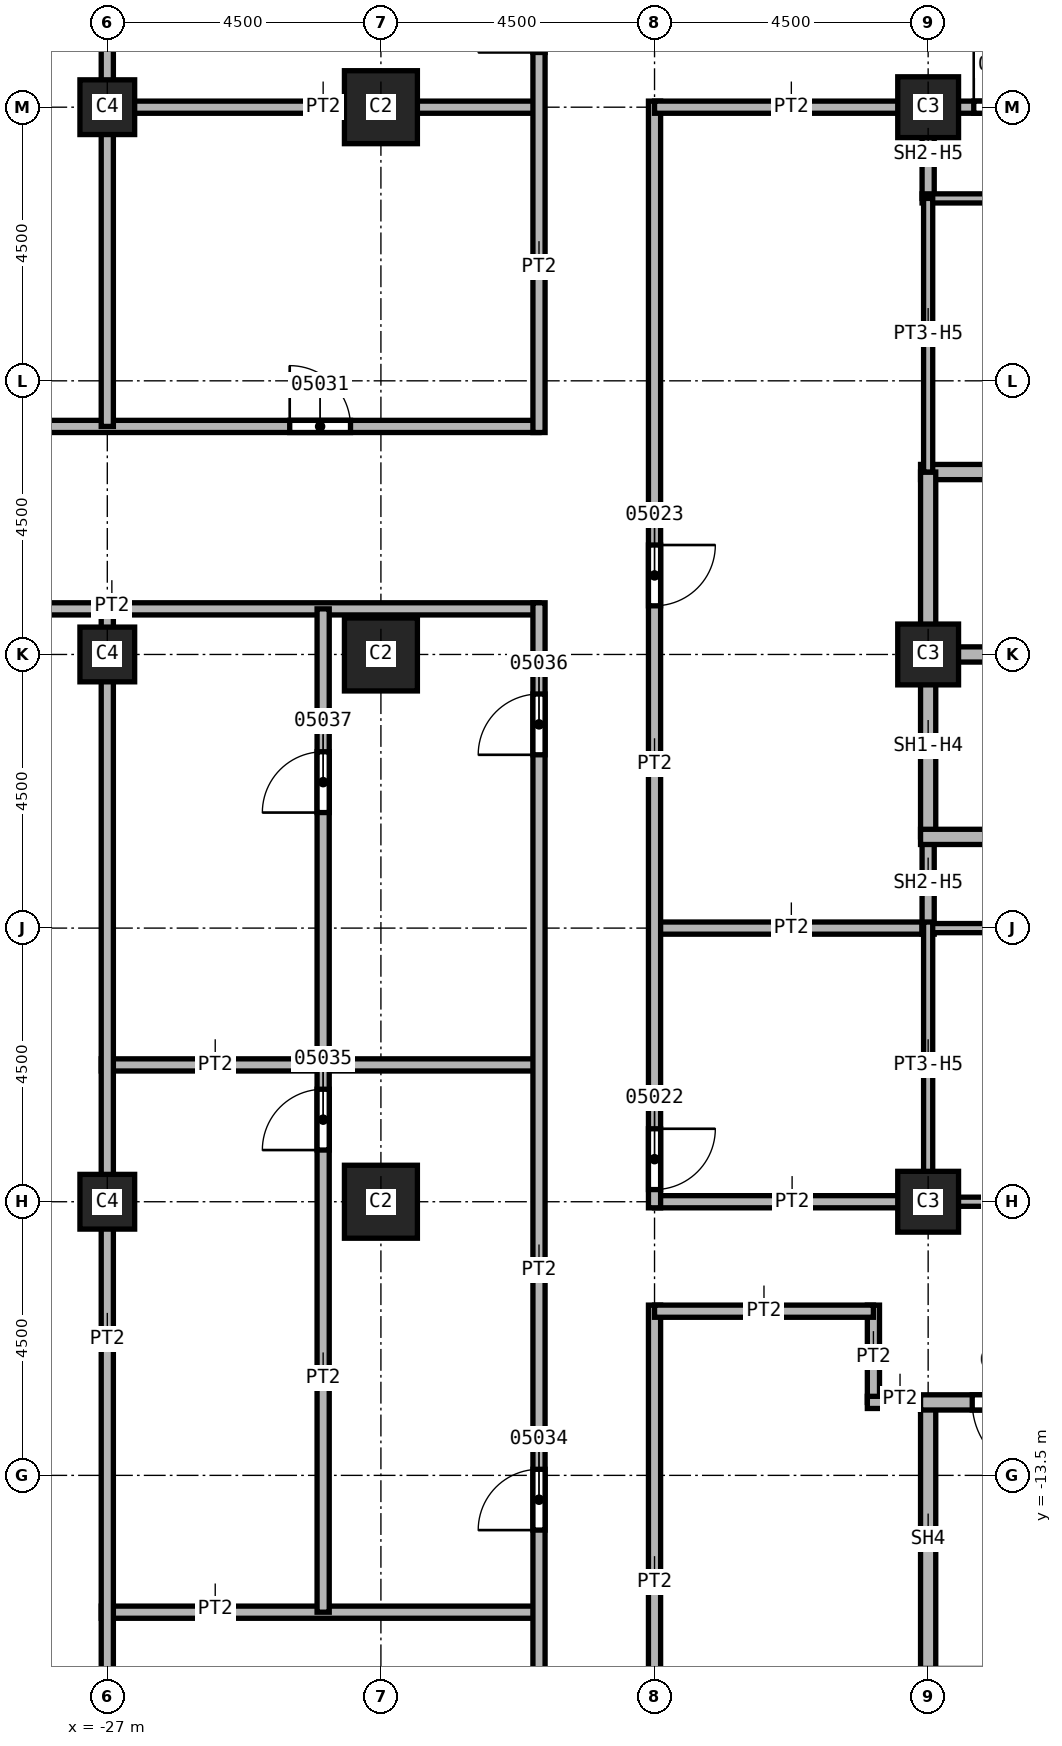
"""IFC4 building model, lengths in metres.
Left out: names, types, materials, properties, quantities, classifications, styles, units other than length and angle.
Written with IfcOpenShell. Run it as: python <this file> out.ifc"""

import sys

from ifc_helpers import new_model, si_unit, direction, frame, frame_2d, origin, origin_2d, place, context, subcontext, project, spatial, rectangle, extrude, element, fill, save


model = new_model("IFC4")
c1 = context("Model", 3, precision=1e-05, world=origin(), true_north=direction((0.0, 1.0)))
c2 = subcontext(c1, "Body", "Model", "MODEL_VIEW")
j1 = project(units=[si_unit("LENGTHUNIT", "METRE"), si_unit("PLANEANGLEUNIT", "RADIAN")], contexts=[c1])
p1 = place(None, origin())
s1 = spatial("IfcSite", under=j1, at=p1, CompositionType="ELEMENT")
p2 = place(p1, origin())
s2 = spatial("IfcBuilding", under=s1, at=p2, CompositionType="ELEMENT")
p3 = place(p2, frame((0.0, 0.0, 112.0)))
s3 = spatial("IfcBuildingStorey", under=s2, at=p3, CompositionType="ELEMENT", Elevation=112.0)
for number, where, z_axis, x_axis in (
    (1, (-22.5, 0.0, 0.0), (0.0, 0.0, 1.0), (1.0, 0.0, 0.0)),
    (2, (-22.5, 9.0, 0.0), (0.0, 0.0, 1.0), (1.0, 0.0, 0.0)),
    (3, (-22.5, -9.0, 0.0), (0.0, 0.0, 1.0), (1.0, 0.0, 0.0)),
):
    element("IfcColumn", number, at=place(p3, frame(where, z_axis=z_axis, x_axis=x_axis)), inside=s3, PredefinedType="COLUMN", context=c2, shape_type="SweptSolid", body=[
        extrude(rectangle(XDim=1.2, YDim=1.2, at=origin_2d()), origin(), (0.0, 0.0, 1.0), 3.7),
    ])
for number, where, z_axis, x_axis in (
    (4, (-13.5, 0.0, 0.0), (0.0, 0.0, 1.0), (1.0, 0.0, 0.0)),
    (5, (-13.5, 9.0, 0.0), (0.0, 0.0, 1.0), (1.0, 0.0, 0.0)),
    (6, (-13.5, -9.0, 0.0), (0.0, 0.0, 1.0), (1.0, 0.0, 0.0)),
):
    element("IfcColumn", number, at=place(p3, frame(where, z_axis=z_axis, x_axis=x_axis)), inside=s3, PredefinedType="COLUMN", context=c2, shape_type="SweptSolid", body=[
        extrude(rectangle(XDim=1.0, YDim=1.0, at=origin_2d()), origin(), (0.0, 0.0, 1.0), 3.7),
    ])
for number, where, z_axis, x_axis in (
    (7, (-27.0, 0.0, 0.0), (0.0, 0.0, 1.0), (1.0, 0.0, 0.0)),
    (8, (-27.0, 9.0, 0.0), (0.0, 0.0, 1.0), (1.0, 0.0, 0.0)),
    (9, (-27.0, -9.0, 0.0), (0.0, 0.0, 1.0), (1.0, 0.0, 0.0)),
):
    element("IfcColumn", number, at=place(p3, frame(where, z_axis=z_axis, x_axis=x_axis)), inside=s3, PredefinedType="COLUMN", context=c2, shape_type="SweptSolid", body=[
        extrude(rectangle(XDim=0.9, YDim=0.9, at=origin_2d()), origin(), (0.0, 0.0, 1.0), 3.7),
    ])
p4 = place(p3, frame((-33.85, 3.75, 0.0), z_axis=(0.0, 0.0, 1.0), x_axis=(1.0, 0.0, 0.0)))
e10 = element("IfcWall", 10, at=p4, inside=s3, PredefinedType="PARTITIONING", context=c2, shape_type="SweptSolid", body=[
    extrude(rectangle(XDim=13.95, YDim=0.2, at=frame_2d((6.975, 0.0))), origin(), (0.0, 0.0, 1.0), 3.7),
])
p5 = place(p4, frame((9.85, 0.0, 0.0)))
e11 = element("IfcOpeningElement", 11, at=p5, cuts=e10, PredefinedType="OPENING", context=c2, shape_type="SweptSolid", body=[
    extrude(rectangle(XDim=1.0, YDim=2.1, at=frame_2d((0.5, 1.05))), frame((0.0, 0.1, 0.0), z_axis=(0.0, -1.0, 0.0), x_axis=(1.0, 0.0, 0.0)), (0.0, 0.0, 1.0), 0.2),
])
for number, where, z_axis, x_axis in (
    (12, (-27.1, -15.75, 0.0), (0.0, 0.0, 1.0), (1.0, 0.0, 0.0)),
    (13, (-27.1, -6.75, 0.0), (0.0, 0.0, 1.0), (1.0, 0.0, 0.0)),
    (14, (-27.1, 9.0, 0.0), (0.0, 0.0, 1.0), (1.0, 0.0, 0.0)),
):
    element("IfcWall", number, at=place(p3, frame(where, z_axis=z_axis, x_axis=x_axis)), inside=s3, PredefinedType="PARTITIONING", context=c2, shape_type="SweptSolid", body=[
        extrude(rectangle(XDim=7.2, YDim=0.2, at=frame_2d((3.6, 0.0))), origin(), (0.0, 0.0, 1.0), 3.7),
    ])
p6 = place(p3, frame((-27.0, -17.4, 0.0), z_axis=(0.0, 0.0, 1.0), x_axis=(0.0, 1.0, 0.0)))
e15 = element("IfcWall", 15, at=p6, inside=s3, PredefinedType="PARTITIONING", context=c2, shape_type="SweptSolid", body=[
    extrude(rectangle(XDim=18.15, YDim=0.2, at=frame_2d((9.075, 0.0))), origin(), (0.0, 0.0, 1.0), 3.7),
])
p7 = place(p3, frame((-27.0, 3.75, 0.0), z_axis=(0.0, 0.0, 1.0), x_axis=(0.0, 1.0, 0.0)))
e16 = element("IfcWall", 16, at=p7, inside=s3, PredefinedType="PARTITIONING", context=c2, shape_type="SweptSolid", body=[
    extrude(rectangle(XDim=13.65, YDim=0.2, at=frame_2d((6.825, 0.0))), origin(), (0.0, 0.0, 1.0), 3.7),
])
p8 = place(p3, frame((-19.9, 0.75, 0.0), z_axis=(0.0, 0.0, 1.0), x_axis=(-1.0, 0.0, 0.0)))
e17 = element("IfcWall", 17, at=p8, inside=s3, PredefinedType="PARTITIONING", context=c2, shape_type="SweptSolid", body=[
    extrude(rectangle(XDim=13.95, YDim=0.2, at=frame_2d((6.975, 0.0))), origin(), (0.0, 0.0, 1.0), 3.7),
])
p9 = place(p3, frame((-23.45, -15.75, 0.0), z_axis=(0.0, 0.0, 1.0), x_axis=(0.0, 1.0, 0.0)))
e18 = element("IfcWall", 18, at=p9, inside=s3, PredefinedType="PARTITIONING", context=c2, shape_type="SweptSolid", body=[
    extrude(rectangle(XDim=16.5, YDim=0.2, at=frame_2d((8.25, 0.0))), origin(), (0.0, 0.0, 1.0), 3.7),
])
p10 = place(p9, frame((7.6, 0.0, 0.0)))
e19 = element("IfcOpeningElement", 19, at=p10, cuts=e18, PredefinedType="OPENING", context=c2, shape_type="SweptSolid", body=[
    extrude(rectangle(XDim=1.0, YDim=2.1, at=frame_2d((0.5, 1.05))), frame((0.0, 0.1, 0.0), z_axis=(0.0, -1.0, 0.0), x_axis=(1.0, 0.0, 0.0)), (0.0, 0.0, 1.0), 0.2),
])
p11 = place(p9, frame((13.15, 0.0, 0.0)))
e20 = element("IfcOpeningElement", 20, at=p11, cuts=e18, PredefinedType="OPENING", context=c2, shape_type="SweptSolid", body=[
    extrude(rectangle(XDim=1.0, YDim=2.1, at=frame_2d((0.5, 1.05))), frame((0.0, 0.1, 0.0), z_axis=(0.0, -1.0, 0.0), x_axis=(1.0, 0.0, 0.0)), (0.0, 0.0, 1.0), 0.2),
])
p12 = place(p3, frame((-19.9, -24.5, 0.0), z_axis=(0.0, 0.0, 1.0), x_axis=(0.0, 1.0, 0.0)))
e21 = element("IfcWall", 21, at=p12, inside=s3, PredefinedType="PARTITIONING", context=c2, shape_type="SweptSolid", body=[
    extrude(rectangle(XDim=25.35, YDim=0.2, at=frame_2d((12.675, 0.0))), origin(), (0.0, 0.0, 1.0), 3.7),
])
p13 = place(p12, frame((2.05, 0.0, 0.0)))
e22 = element("IfcOpeningElement", 22, at=p13, cuts=e21, PredefinedType="OPENING", context=c2, shape_type="SweptSolid", body=[
    extrude(rectangle(XDim=1.0, YDim=2.1, at=frame_2d((0.5, 1.05))), frame((0.0, 0.1, 0.0), z_axis=(0.0, -1.0, 0.0), x_axis=(1.0, 0.0, 0.0)), (0.0, 0.0, 1.0), 0.2),
])
p14 = place(p12, frame((10.1, 0.0, 0.0)))
e23 = element("IfcOpeningElement", 23, at=p14, cuts=e21, PredefinedType="OPENING", context=c2, shape_type="SweptSolid", body=[
    extrude(rectangle(XDim=1.0, YDim=2.1, at=frame_2d((0.5, 1.05))), frame((0.0, 0.1, 0.0), z_axis=(0.0, -1.0, 0.0), x_axis=(1.0, 0.0, 0.0)), (0.0, 0.0, 1.0), 0.2),
])
p15 = place(p12, frame((22.85, 0.0, 0.0)))
e24 = element("IfcOpeningElement", 24, at=p15, cuts=e21, PredefinedType="OPENING", context=c2, shape_type="SweptSolid", body=[
    extrude(rectangle(XDim=1.0, YDim=2.1, at=frame_2d((0.5, 1.05))), frame((0.0, 0.1, 0.0), z_axis=(0.0, -1.0, 0.0), x_axis=(1.0, 0.0, 0.0)), (0.0, 0.0, 1.0), 0.2),
])
p16 = place(p3, frame((-19.9, 3.65, 0.0), z_axis=(0.0, 0.0, 1.0), x_axis=(0.0, 1.0, 0.0)))
e25 = element("IfcWall", 25, at=p16, inside=s3, PredefinedType="PARTITIONING", context=c2, shape_type="SweptSolid", body=[
    extrude(rectangle(XDim=9.95, YDim=0.2, at=frame_2d((4.975, 0.0))), origin(), (0.0, 0.0, 1.0), 3.7),
])
p17 = place(p16, frame((6.25, 0.0, 0.0)))
e26 = element("IfcOpeningElement", 26, at=p17, cuts=e25, PredefinedType="OPENING", context=c2, shape_type="SweptSolid", body=[
    extrude(rectangle(XDim=1.0, YDim=2.1, at=frame_2d((0.5, 1.05))), frame((0.0, 0.1, 0.0), z_axis=(0.0, -1.0, 0.0), x_axis=(1.0, 0.0, 0.0)), (0.0, 0.0, 1.0), 0.2),
])
p18 = place(p3, frame((-18.0, -10.7, 0.0), z_axis=(0.0, 0.0, 1.0), x_axis=(0.0, -1.0, 0.0)))
e27 = element("IfcWall", 27, at=p18, inside=s3, PredefinedType="PARTITIONING", context=c2, shape_type="SweptSolid", body=[
    extrude(rectangle(XDim=13.5, YDim=0.2, at=frame_2d((6.75, 0.0))), origin(), (0.0, 0.0, 1.0), 3.7),
])
p19 = place(p18, frame((8.9, 0.0, 0.0)))
e28 = element("IfcOpeningElement", 28, at=p19, cuts=e27, PredefinedType="OPENING", context=c2, shape_type="SweptSolid", body=[
    extrude(rectangle(XDim=1.0, YDim=2.1, at=frame_2d((0.5, 1.05))), frame((0.0, 0.1, 0.0), z_axis=(0.0, -1.0, 0.0), x_axis=(1.0, 0.0, 0.0)), (0.0, 0.0, 1.0), 0.2),
])
for number, where, z_axis, x_axis in (
    (29, (-18.0, -9.0, 0.0), (0.0, 0.0, 1.0), (1.0, 0.0, 0.0)),
    (30, (-18.0, -4.5, 0.0), (0.0, 0.0, 1.0), (1.0, 0.0, 0.0)),
):
    element("IfcWall", number, at=place(p3, frame(where, z_axis=z_axis, x_axis=x_axis)), inside=s3, PredefinedType="PARTITIONING", context=c2, shape_type="SweptSolid", body=[
        extrude(rectangle(XDim=4.5, YDim=0.2, at=frame_2d((2.25, 0.0))), origin(), (0.0, 0.0, 1.0), 3.7),
    ])
p20 = place(p3, frame((-18.0, 9.1, 0.0), z_axis=(0.0, 0.0, 1.0), x_axis=(0.0, -1.0, 0.0)))
e31 = element("IfcWall", 31, at=p20, inside=s3, PredefinedType="PARTITIONING", context=c2, shape_type="SweptSolid", body=[
    extrude(rectangle(XDim=18.2, YDim=0.2, at=frame_2d((9.1, 0.0))), origin(), (0.0, 0.0, 1.0), 3.7),
])
p21 = place(p20, frame((16.9, 0.0, 0.0)))
e32 = element("IfcOpeningElement", 32, at=p21, cuts=e31, PredefinedType="OPENING", context=c2, shape_type="SweptSolid", body=[
    extrude(rectangle(XDim=1.0, YDim=2.1, at=frame_2d((0.5, 1.05))), frame((0.0, 0.1, 0.0), z_axis=(0.0, -1.0, 0.0), x_axis=(1.0, 0.0, 0.0)), (0.0, 0.0, 1.0), 0.2),
])
p22 = place(p20, frame((7.3, 0.0, 0.0)))
e33 = element("IfcOpeningElement", 33, at=p22, cuts=e31, PredefinedType="OPENING", context=c2, shape_type="SweptSolid", body=[
    extrude(rectangle(XDim=1.0, YDim=2.1, at=frame_2d((0.5, 1.05))), frame((0.0, 0.1, 0.0), z_axis=(0.0, -1.0, 0.0), x_axis=(1.0, 0.0, 0.0)), (0.0, 0.0, 1.0), 0.2),
])
p23 = place(p3, frame((-14.4, -12.3, 0.0), z_axis=(0.0, 0.0, 1.0), x_axis=(0.0, 1.0, 0.0)))
e34 = element("IfcWall", 34, at=p23, inside=s3, PredefinedType="PARTITIONING", context=c2, shape_type="SweptSolid", body=[
    extrude(rectangle(XDim=1.6, YDim=0.2, at=frame_2d((0.8, 0.0))), origin(), (0.0, 0.0, 1.0), 3.7),
])
p24 = place(p3, frame((-14.4, -10.8, 0.0), z_axis=(0.0, 0.0, 1.0), x_axis=(-1.0, 0.0, 0.0)))
e35 = element("IfcWall", 35, at=p24, inside=s3, PredefinedType="PARTITIONING", context=c2, shape_type="SweptSolid", body=[
    extrude(rectangle(XDim=3.6, YDim=0.2, at=frame_2d((1.8, 0.0))), origin(), (0.0, 0.0, 1.0), 3.7),
])
p25 = place(p3, frame((-13.5, 9.0, 0.0), z_axis=(0.0, 0.0, 1.0), x_axis=(-1.0, 0.0, 0.0)))
e36 = element("IfcWall", 36, at=p25, inside=s3, PredefinedType="PARTITIONING", context=c2, shape_type="SweptSolid", body=[
    extrude(rectangle(XDim=4.5, YDim=0.2, at=frame_2d((2.25, 0.0))), origin(), (0.0, 0.0, 1.0), 3.7),
])
p26 = place(p3, frame((-13.375, -12.3, 0.0), z_axis=(0.0, 0.0, 1.0), x_axis=(-1.0, 0.0, 0.0)))
e37 = element("IfcWall", 37, at=p26, inside=s3, PredefinedType="PARTITIONING", context=c2, shape_type="SweptSolid", body=[
    extrude(rectangle(XDim=1.125, YDim=0.2, at=frame_2d((0.562, 0.0))), origin(), (0.0, 0.0, 1.0), 3.7),
])
p27 = place(p3, frame((-13.6, 9.0, 0.0), z_axis=(0.0, 0.0, 1.0), x_axis=(1.0, 0.0, 0.0)))
e38 = element("IfcWall", 38, at=p27, inside=s3, PredefinedType="SOLIDWALL", context=c2, shape_type="SweptSolid", body=[
    extrude(rectangle(XDim=3.1, YDim=0.2, at=frame_2d((1.55, 0.0))), origin(), (0.0, 0.0, 1.0), 2.938),
])
p28 = place(p27, frame((0.85, 0.0, 0.0)))
e39 = element("IfcOpeningElement", 39, at=p28, cuts=e38, PredefinedType="OPENING", context=c2, shape_type="SweptSolid", body=[
    extrude(rectangle(XDim=1.1, YDim=2.1, at=frame_2d((0.55, 1.05))), frame((0.0, 0.1, 0.0), z_axis=(0.0, -1.0, 0.0), x_axis=(1.0, 0.0, 0.0)), (0.0, 0.0, 1.0), 0.2),
])
for number, where, z_axis, x_axis in (
    (40, (-13.5, -4.6, 0.0), (0.0, 0.0, 1.0), (0.0, 1.0, 0.0)),
    (41, (-13.5, 7.5, 0.0), (0.0, 0.0, 1.0), (0.0, 1.0, 0.0)),
):
    element("IfcWall", number, at=place(p3, frame(where, z_axis=z_axis, x_axis=x_axis)), inside=s3, PredefinedType="SOLIDWALL", context=c2, shape_type="SweptSolid", body=[
        extrude(rectangle(XDim=1.6, YDim=0.2, at=frame_2d((0.8, 0.0))), origin(), (0.0, 0.0, 1.0), 2.938),
    ])
p29 = place(p3, frame((-13.625, 0.0, 0.0), z_axis=(0.0, 0.0, 1.0), x_axis=(1.0, 0.0, 0.0)))
e42 = element("IfcWall", 42, at=p29, inside=s3, PredefinedType="SOLIDWALL", context=c2, shape_type="SweptSolid", body=[
    extrude(rectangle(XDim=3.125, YDim=0.25, at=frame_2d((1.562, 0.0))), origin(), (0.0, 0.0, 1.0), 3.7),
])
p30 = place(p3, frame((-13.625, 3.0, 0.0), z_axis=(0.0, 0.0, 1.0), x_axis=(1.0, 0.0, 0.0)))
e43 = element("IfcWall", 43, at=p30, inside=s3, PredefinedType="SOLIDWALL", context=c2, shape_type="SweptSolid", body=[
    extrude(rectangle(XDim=6.125, YDim=0.25, at=frame_2d((3.062, 0.0))), origin(), (0.0, 0.0, 1.0), 3.7),
])
p31 = place(p30, frame((3.25, 0.0, 0.0)))
e44 = element("IfcOpeningElement", 44, at=p31, cuts=e43, PredefinedType="OPENING", context=c2, shape_type="SweptSolid", body=[
    extrude(rectangle(XDim=1.1, YDim=2.1, at=frame_2d((0.55, 1.05))), frame((0.0, 0.125, 0.0), z_axis=(0.0, -1.0, 0.0), x_axis=(1.0, 0.0, 0.0)), (0.0, 0.0, 1.0), 0.25),
])
p32 = place(p3, frame((-13.5, -3.0, 0.0), z_axis=(0.0, 0.0, 1.0), x_axis=(0.0, 1.0, 0.0)))
e45 = element("IfcWall", 45, at=p32, inside=s3, PredefinedType="SOLIDWALL", context=c2, shape_type="SweptSolid", body=[
    extrude(rectangle(XDim=6.0, YDim=0.25, at=frame_2d((3.0, 0.0))), origin(), (0.0, 0.0, 1.0), 2.938),
])
p33 = place(p3, frame((-13.625, -3.0, 0.0), z_axis=(0.0, 0.0, 1.0), x_axis=(1.0, 0.0, 0.0)))
e46 = element("IfcWall", 46, at=p33, inside=s3, PredefinedType="SOLIDWALL", context=c2, shape_type="SweptSolid", body=[
    extrude(rectangle(XDim=9.25, YDim=0.25, at=frame_2d((4.625, 0.0))), origin(), (0.0, 0.0, 1.0), 3.7),
])
p34 = place(p33, frame((3.25, 0.0, 0.0)))
e47 = element("IfcOpeningElement", 47, at=p34, cuts=e46, PredefinedType="OPENING", context=c2, shape_type="SweptSolid", body=[
    extrude(rectangle(XDim=1.1, YDim=2.1, at=frame_2d((0.55, 1.05))), frame((0.0, 0.125, 0.0), z_axis=(0.0, -1.0, 0.0), x_axis=(1.0, 0.0, 0.0)), (0.0, 0.0, 1.0), 0.25),
])
p35 = place(p3, frame((-13.5, -16.8, 0.0), z_axis=(0.0, 0.0, 1.0), x_axis=(0.0, 1.0, 0.0)))
e48 = element("IfcWall", 48, at=p35, inside=s3, PredefinedType="SOLIDWALL", context=c2, shape_type="SweptSolid", body=[
    extrude(rectangle(XDim=4.5, YDim=0.25, at=frame_2d((2.25, 0.0))), origin(), (0.0, 0.0, 1.0), 3.7),
])
p36 = place(p3, frame((-4.375, -12.3, 0.0), z_axis=(0.0, 0.0, 1.0), x_axis=(-1.0, 0.0, 0.0)))
e49 = element("IfcWall", 49, at=p36, inside=s3, PredefinedType="SOLIDWALL", context=c2, shape_type="SweptSolid", body=[
    extrude(rectangle(XDim=9.25, YDim=0.25, at=frame_2d((4.625, 0.0))), origin(), (0.0, 0.0, 1.0), 3.7),
])
p37 = place(p36, frame((7.2, 0.0, 0.0)))
e50 = element("IfcOpeningElement", 50, at=p37, cuts=e49, PredefinedType="OPENING", context=c2, shape_type="SweptSolid", body=[
    extrude(rectangle(XDim=1.2, YDim=2.1, at=frame_2d((0.6, 1.05))), frame((0.0, 0.125, 0.0), z_axis=(0.0, -1.0, 0.0), x_axis=(1.0, 0.0, 0.0)), (0.0, 0.0, 1.0), 0.25),
])
for number, where, z_axis, x_axis in (
    (51, (-13.6, -4.5, 0.0), (0.0, 0.0, 1.0), (1.0, 0.0, 0.0)),
    (52, (-13.6, 7.5, 0.0), (0.0, 0.0, 1.0), (1.0, 0.0, 0.0)),
):
    element("IfcWall", number, at=place(p3, frame(where, z_axis=z_axis, x_axis=x_axis)), inside=s3, PredefinedType="PARTITIONING", context=c2, shape_type="SweptSolid", body=[
        extrude(rectangle(XDim=3.1, YDim=0.15, at=frame_2d((1.55, 0.0))), origin(), (0.0, 0.0, 1.0), 3.7),
    ])
p38 = place(p3, frame((-13.5, -9.1, 0.0), z_axis=(0.0, 0.0, 1.0), x_axis=(0.0, 1.0, 0.0)))
e53 = element("IfcWall", 53, at=p38, inside=s3, PredefinedType="PARTITIONING", context=c2, shape_type="SweptSolid", body=[
    extrude(rectangle(XDim=4.7, YDim=0.15, at=frame_2d((2.35, 0.0))), origin(), (0.0, 0.0, 1.0), 2.938),
])
p39 = place(p3, frame((-13.5, 3.0, 0.0), z_axis=(0.0, 0.0, 1.0), x_axis=(0.0, 1.0, 0.0)))
e54 = element("IfcWall", 54, at=p39, inside=s3, PredefinedType="PARTITIONING", context=c2, shape_type="SweptSolid", body=[
    extrude(rectangle(XDim=4.5, YDim=0.15, at=frame_2d((2.25, 0.0))), origin(), (0.0, 0.0, 1.0), 2.938),
])
p40 = place(p3, frame((-10.5, -9.0, 0.0), z_axis=(0.0, 0.0, 1.0), x_axis=(-1.0, 0.0, 0.0)))
e55 = element("IfcWall", 55, at=p40, inside=s3, PredefinedType="PARTITIONING", context=c2, shape_type="SweptSolid", body=[
    extrude(rectangle(XDim=3.075, YDim=0.15, at=frame_2d((1.538, 0.0))), origin(), (0.0, 0.0, 1.0), 2.938),
])
p41 = place(p28, origin())
e56 = element("IfcDoor", 56, at=p41, inside=s3, OperationType="SINGLE_SWING_RIGHT", PredefinedType="DOOR", context=c2, shape_type="SweptSolid", body=[
    extrude(rectangle(XDim=1.1, YDim=2.1, at=frame_2d((0.55, 1.05))), frame((0.0, 0.025, 0.0), z_axis=(0.0, -1.0, 0.0), x_axis=(1.0, 0.0, 0.0)), (0.0, 0.0, 1.0), 0.05),
])
fill(e39, e56)
p42 = place(p37, origin())
e57 = element("IfcDoor", 57, at=p42, inside=s3, OperationType="SINGLE_SWING_RIGHT", PredefinedType="DOOR", context=c2, shape_type="SweptSolid", body=[
    extrude(rectangle(XDim=1.2, YDim=2.1, at=frame_2d((0.6, 1.05))), frame((0.0, 0.025, 0.0), z_axis=(0.0, -1.0, 0.0), x_axis=(1.0, 0.0, 0.0)), (0.0, 0.0, 1.0), 0.05),
])
fill(e50, e57)
p43 = place(p21, origin())
e58 = element("IfcDoor", 58, at=p43, inside=s3, OperationType="SINGLE_SWING_LEFT", PredefinedType="DOOR", context=c2, shape_type="SweptSolid", body=[
    extrude(rectangle(XDim=1.0, YDim=2.1, at=frame_2d((0.5, 1.05))), frame((0.0, 0.025, 0.0), z_axis=(0.0, -1.0, 0.0), x_axis=(1.0, 0.0, 0.0)), (0.0, 0.0, 1.0), 0.05),
])
fill(e32, e58)
p44 = place(p22, origin())
e59 = element("IfcDoor", 59, at=p44, inside=s3, OperationType="SINGLE_SWING_RIGHT", PredefinedType="DOOR", context=c2, shape_type="SweptSolid", body=[
    extrude(rectangle(XDim=1.0, YDim=2.1, at=frame_2d((0.5, 1.05))), frame((0.0, 0.025, 0.0), z_axis=(0.0, -1.0, 0.0), x_axis=(1.0, 0.0, 0.0)), (0.0, 0.0, 1.0), 0.05),
])
fill(e33, e59)
p45 = place(p5, origin())
e60 = element("IfcDoor", 60, at=p45, inside=s3, OperationType="SINGLE_SWING_RIGHT", PredefinedType="DOOR", context=c2, shape_type="SweptSolid", body=[
    extrude(rectangle(XDim=1.0, YDim=2.1, at=frame_2d((0.5, 1.05))), frame((0.0, 0.025, 0.0), z_axis=(0.0, -1.0, 0.0), x_axis=(1.0, 0.0, 0.0)), (0.0, 0.0, 1.0), 0.05),
])
fill(e11, e60)
p46 = place(p14, origin())
e61 = element("IfcDoor", 61, at=p46, inside=s3, OperationType="SINGLE_SWING_LEFT", PredefinedType="DOOR", context=c2, shape_type="SweptSolid", body=[
    extrude(rectangle(XDim=1.0, YDim=2.1, at=frame_2d((0.5, 1.05))), frame((0.0, 0.025, 0.0), z_axis=(0.0, -1.0, 0.0), x_axis=(1.0, 0.0, 0.0)), (0.0, 0.0, 1.0), 0.05),
])
fill(e23, e61)
p47 = place(p10, origin())
e62 = element("IfcDoor", 62, at=p47, inside=s3, OperationType="SINGLE_SWING_RIGHT", PredefinedType="DOOR", context=c2, shape_type="SweptSolid", body=[
    extrude(rectangle(XDim=1.0, YDim=2.1, at=frame_2d((0.5, 1.05))), frame((0.0, 0.025, 0.0), z_axis=(0.0, -1.0, 0.0), x_axis=(1.0, 0.0, 0.0)), (0.0, 0.0, 1.0), 0.05),
])
fill(e19, e62)
p48 = place(p15, origin())
e63 = element("IfcDoor", 63, at=p48, inside=s3, OperationType="SINGLE_SWING_LEFT", PredefinedType="DOOR", context=c2, shape_type="SweptSolid", body=[
    extrude(rectangle(XDim=1.0, YDim=2.1, at=frame_2d((0.5, 1.05))), frame((0.0, 0.025, 0.0), z_axis=(0.0, -1.0, 0.0), x_axis=(1.0, 0.0, 0.0)), (0.0, 0.0, 1.0), 0.05),
])
fill(e24, e63)
p49 = place(p11, origin())
e64 = element("IfcDoor", 64, at=p49, inside=s3, OperationType="SINGLE_SWING_RIGHT", PredefinedType="DOOR", context=c2, shape_type="SweptSolid", body=[
    extrude(rectangle(XDim=1.0, YDim=2.1, at=frame_2d((0.5, 1.05))), frame((0.0, 0.025, 0.0), z_axis=(0.0, -1.0, 0.0), x_axis=(1.0, 0.0, 0.0)), (0.0, 0.0, 1.0), 0.05),
])
fill(e20, e64)
save(model, sys.argv[1])
